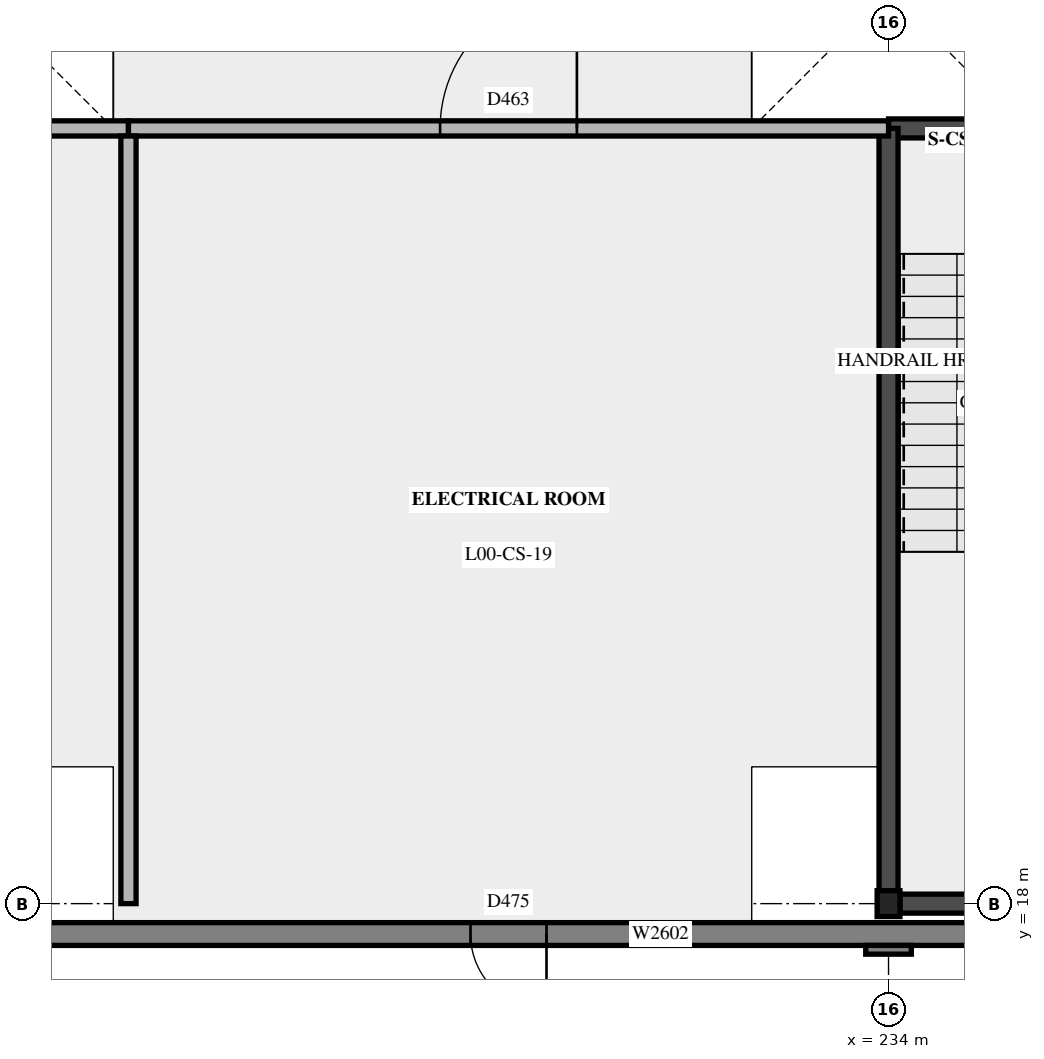
"""IFC4 building model, lengths in metres.
Left out: names, types, materials, properties, quantities, classifications, styles, units other than length and angle.
Written with IfcOpenShell. Run it as: python <this file> out.ifc"""

import sys

from ifc_helpers import new_model, si_unit, direction, frame, frame_2d, origin, origin_2d, place, context, subcontext, project, spatial, polyline, rectangle, i_section, outline, extrude, element, fill, save


model = new_model("IFC4")
c1 = context("Model", 3, precision=1e-05, world=origin(), true_north=direction((0.0, 1.0)))
c2 = subcontext(c1, "Body", "Model", "MODEL_VIEW")
j1 = project(units=[si_unit("LENGTHUNIT", "METRE"), si_unit("PLANEANGLEUNIT", "RADIAN")], contexts=[c1])
p1 = place(None, origin())
s1 = spatial("IfcSite", under=j1, at=p1, CompositionType="ELEMENT")
p2 = place(p1, origin())
s2 = spatial("IfcBuilding", under=s1, at=p2, CompositionType="ELEMENT")
p3 = place(p2, origin())
s3 = spatial("IfcBuildingStorey", under=s2, at=p3, CompositionType="ELEMENT", Elevation=0.0)
p4 = place(p3, frame((234.0, 18.0, 0.0), z_axis=(0.0, 0.0, 1.0), x_axis=(1.0, 0.0, 0.0)))
e1 = element("IfcColumn", 1, at=p4, inside=s3, PredefinedType="COLUMN", context=c2, shape_type="SweptSolid", body=[
    extrude(i_section(OverallWidth=0.3, OverallDepth=0.34, WebThickness=0.012, FlangeThickness=0.021, at=origin_2d()), origin(), (0.0, 0.0, 1.0), 5.4),
])
p5 = place(p3, frame((234.15, 18.0, 0.0), z_axis=(0.0, 0.0, 1.0), x_axis=(1.0, 0.0, 0.0)))
e2 = element("IfcWall", 2, at=p5, inside=s3, PredefinedType="SHEAR", context=c2, shape_type="SweptSolid", body=[
    extrude(rectangle(XDim=4.85, YDim=0.25, at=frame_2d((2.425, 0.0))), origin(), (0.0, 0.0, 1.0), 5.4),
])
p6 = place(p3, frame((234.0, 28.2, 0.0), z_axis=(0.0, 0.0, 1.0), x_axis=(1.0, 0.0, 0.0)))
e3 = element("IfcWall", 3, at=p6, inside=s3, PredefinedType="SHEAR", context=c2, shape_type="SweptSolid", body=[
    extrude(rectangle(XDim=5.0, YDim=0.25, at=frame_2d((2.5, 0.0))), origin(), (0.0, 0.0, 1.0), 5.4),
])
p7 = place(p6, frame((2.0, 0.0, 0.0)))
e4 = element("IfcOpeningElement", 4, at=p7, cuts=e3, PredefinedType="OPENING", context=c2, shape_type="SweptSolid", body=[
    extrude(rectangle(XDim=1.0, YDim=2.1, at=frame_2d((0.5, 1.05))), frame((0.0, 0.135, 0.0), z_axis=(0.0, -1.0, 0.0), x_axis=(1.0, 0.0, 0.0)), (0.0, 0.0, 1.0), 0.27),
])
p8 = place(p3, frame((234.0, 18.17, 0.0), z_axis=(0.0, 0.0, 1.0), x_axis=(0.0, 1.0, 0.0)))
e5 = element("IfcWall", 5, at=p8, inside=s3, PredefinedType="SHEAR", context=c2, shape_type="SweptSolid", body=[
    extrude(rectangle(XDim=10.03, YDim=0.25, at=frame_2d((5.015, 0.0))), origin(), (0.0, 0.0, 1.0), 5.4),
])
p9 = place(p3, frame((197.75, 17.6, 0.0), z_axis=(0.0, 0.0, 1.0), x_axis=(1.0, 0.0, 0.0)))
e6 = element("IfcWall", 6, at=p9, inside=s3, PredefinedType="SOLIDWALL", context=c2, shape_type="SweptSolid", body=[
    extrude(rectangle(XDim=84.5, YDim=0.3, at=frame_2d((42.25, 0.0))), origin(), (0.0, 0.0, 1.0), 5.4),
])
p10 = place(p9, frame((19.75, 0.0, 0.0), z_axis=(0.0, 0.0, 1.0), x_axis=(-1.0, 0.0, 0.0)))
e7 = element("IfcOpeningElement", 7, at=p10, cuts=e6, PredefinedType="OPENING", context=c2, shape_type="SweptSolid", body=[
    extrude(rectangle(XDim=1.0, YDim=2.1, at=frame_2d((0.5, 1.05))), frame((0.0, 0.16, 0.0), z_axis=(0.0, -1.0, 0.0), x_axis=(1.0, 0.0, 0.0)), (0.0, 0.0, 1.0), 0.32),
])
p11 = place(p9, frame((31.75, 0.0, 0.0), z_axis=(0.0, 0.0, 1.0), x_axis=(-1.0, 0.0, 0.0)))
e8 = element("IfcOpeningElement", 8, at=p11, cuts=e6, PredefinedType="OPENING", context=c2, shape_type="SweptSolid", body=[
    extrude(rectangle(XDim=1.0, YDim=2.1, at=frame_2d((0.5, 1.05))), frame((0.0, 0.16, 0.0), z_axis=(0.0, -1.0, 0.0), x_axis=(1.0, 0.0, 0.0)), (0.0, 0.0, 1.0), 0.32),
])
p12 = place(p9, frame((53.75, 0.0, 0.0), z_axis=(0.0, 0.0, 1.0), x_axis=(-1.0, 0.0, 0.0)))
e9 = element("IfcOpeningElement", 9, at=p12, cuts=e6, PredefinedType="OPENING", context=c2, shape_type="SweptSolid", body=[
    extrude(rectangle(XDim=1.0, YDim=2.1, at=frame_2d((0.5, 1.05))), frame((0.0, 0.16, 0.0), z_axis=(0.0, -1.0, 0.0), x_axis=(1.0, 0.0, 0.0)), (0.0, 0.0, 1.0), 0.32),
])
p13 = place(p9, frame((74.75, 0.0, 0.0), z_axis=(0.0, 0.0, 1.0), x_axis=(-1.0, 0.0, 0.0)))
e10 = element("IfcOpeningElement", 10, at=p13, cuts=e6, PredefinedType="OPENING", context=c2, shape_type="SweptSolid", body=[
    extrude(rectangle(XDim=1.0, YDim=2.1, at=frame_2d((0.5, 1.05))), frame((0.0, 0.16, 0.0), z_axis=(0.0, -1.0, 0.0), x_axis=(1.0, 0.0, 0.0)), (0.0, 0.0, 1.0), 0.32),
])
p14 = place(p9, frame((9.025, 0.0, 1.8)))
e11 = element("IfcOpeningElement", 11, at=p14, cuts=e6, PredefinedType="OPENING", context=c2, shape_type="SweptSolid", body=[
    extrude(rectangle(XDim=0.45, YDim=2.4, at=frame_2d((0.225, 1.2))), frame((0.0, 0.16, 0.0), z_axis=(0.0, -1.0, 0.0), x_axis=(1.0, 0.0, 0.0)), (0.0, 0.0, 1.0), 0.32),
])
p15 = place(p9, frame((33.025, 0.0, 1.8)))
e12 = element("IfcOpeningElement", 12, at=p15, cuts=e6, PredefinedType="OPENING", context=c2, shape_type="SweptSolid", body=[
    extrude(rectangle(XDim=0.45, YDim=2.4, at=frame_2d((0.225, 1.2))), frame((0.0, 0.16, 0.0), z_axis=(0.0, -1.0, 0.0), x_axis=(1.0, 0.0, 0.0)), (0.0, 0.0, 1.0), 0.32),
])
p16 = place(p9, frame((45.025, 0.0, 1.8)))
e13 = element("IfcOpeningElement", 13, at=p16, cuts=e6, PredefinedType="OPENING", context=c2, shape_type="SweptSolid", body=[
    extrude(rectangle(XDim=0.45, YDim=2.4, at=frame_2d((0.225, 1.2))), frame((0.0, 0.16, 0.0), z_axis=(0.0, -1.0, 0.0), x_axis=(1.0, 0.0, 0.0)), (0.0, 0.0, 1.0), 0.32),
])
p17 = place(p9, frame((57.025, 0.0, 1.8)))
e14 = element("IfcOpeningElement", 14, at=p17, cuts=e6, PredefinedType="OPENING", context=c2, shape_type="SweptSolid", body=[
    extrude(rectangle(XDim=0.45, YDim=2.4, at=frame_2d((0.225, 1.2))), frame((0.0, 0.16, 0.0), z_axis=(0.0, -1.0, 0.0), x_axis=(1.0, 0.0, 0.0)), (0.0, 0.0, 1.0), 0.32),
])
p18 = place(p9, frame((81.025, 0.0, 1.8)))
e15 = element("IfcOpeningElement", 15, at=p18, cuts=e6, PredefinedType="OPENING", context=c2, shape_type="SweptSolid", body=[
    extrude(rectangle(XDim=0.45, YDim=2.4, at=frame_2d((0.225, 1.2))), frame((0.0, 0.16, 0.0), z_axis=(0.0, -1.0, 0.0), x_axis=(1.0, 0.0, 0.0)), (0.0, 0.0, 1.0), 0.32),
])
p19 = place(p3, frame((233.7, 17.393, 0.0), z_axis=(0.0, 0.0, 1.0), x_axis=(1.0, 0.0, 0.0)))
e16 = element("IfcWall", 16, at=p19, inside=s3, PredefinedType="SOLIDWALL", context=c2, shape_type="SweptSolid", body=[
    extrude(rectangle(XDim=0.6, YDim=0.115, at=frame_2d((0.3, 0.0))), origin(), (0.0, 0.0, 1.0), 5.4),
])
p20 = place(p3, frame((215.0, 28.2, 0.0), z_axis=(0.0, 0.0, 1.0), x_axis=(1.0, 0.0, 0.0)))
e17 = element("IfcWall", 17, at=p20, inside=s3, PredefinedType="PARTITIONING", context=c2, shape_type="SweptSolid", body=[
    extrude(outline(polyline([(0.0, 0.0), (9.0, 0.0), (9.0, 5.15), (7.1, 5.15), (7.095, 4.68), (6.905, 4.68), (6.9, 5.15), (4.705, 5.15), (4.7, 4.63), (4.5, 4.63), (4.495, 5.15), (2.305, 5.15), (2.3, 4.63), (2.1, 4.63), (2.095, 5.15), (0.0, 5.15), (0.0, 0.0)])), frame((0.0, 0.1, 0.0), z_axis=(0.0, -1.0, 0.0), x_axis=(1.0, 0.0, 0.0)), (0.0, 0.0, 1.0), 0.2),
])
p21 = place(p20, frame((3.6, 0.0, 0.0)))
e18 = element("IfcOpeningElement", 18, at=p21, cuts=e17, PredefinedType="OPENING", context=c2, shape_type="SweptSolid", body=[
    extrude(rectangle(XDim=1.8, YDim=2.1, at=frame_2d((0.9, 1.05))), frame((0.0, 0.11, 0.0), z_axis=(0.0, -1.0, 0.0), x_axis=(1.0, 0.0, 0.0)), (0.0, 0.0, 1.0), 0.22),
])
p22 = place(p3, frame((224.0, 28.2, 0.0), z_axis=(0.0, 0.0, 1.0), x_axis=(1.0, 0.0, 0.0)))
e19 = element("IfcWall", 19, at=p22, inside=s3, PredefinedType="PARTITIONING", context=c2, shape_type="SweptSolid", body=[
    extrude(outline(polyline([(0.0, 0.0), (10.0, 0.0), (10.0, 5.15), (7.705, 5.15), (7.7, 4.63), (7.5, 4.63), (7.495, 5.15), (5.305, 5.15), (5.3, 4.63), (5.1, 4.63), (5.095, 5.15), (2.905, 5.15), (2.9, 4.63), (2.7, 4.63), (2.695, 5.15), (0.505, 5.15), (0.5, 4.63), (0.3, 4.63), (0.295, 5.15), (0.0, 5.15), (0.0, 0.0)])), frame((0.0, 0.1, 0.0), z_axis=(0.0, -1.0, 0.0), x_axis=(1.0, 0.0, 0.0)), (0.0, 0.0, 1.0), 0.2),
])
p23 = place(p22, frame((4.1, 0.0, 0.0)))
e20 = element("IfcOpeningElement", 20, at=p23, cuts=e19, PredefinedType="OPENING", context=c2, shape_type="SweptSolid", body=[
    extrude(rectangle(XDim=1.8, YDim=2.1, at=frame_2d((0.9, 1.05))), frame((0.0, 0.11, 0.0), z_axis=(0.0, -1.0, 0.0), x_axis=(1.0, 0.0, 0.0)), (0.0, 0.0, 1.0), 0.22),
])
p24 = place(p3, frame((224.0, 18.0, 0.0), z_axis=(0.0, 0.0, 1.0), x_axis=(0.0, 1.0, 0.0)))
e21 = element("IfcWall", 21, at=p24, inside=s3, PredefinedType="PARTITIONING", context=c2, shape_type="SweptSolid", body=[
    extrude(outline(polyline([(0.0, 0.0), (10.1, 0.0), (10.1, 5.15), (0.105, 5.15), (0.1, 4.63), (0.0, 4.63), (0.0, 0.0)])), frame((0.0, 0.1, 0.0), z_axis=(0.0, -1.0, 0.0), x_axis=(1.0, 0.0, 0.0)), (0.0, 0.0, 1.0), 0.2),
])
p25 = place(p11, origin())
e22 = element("IfcDoor", 22, at=p25, inside=s3, OperationType="SINGLE_SWING_LEFT", PredefinedType="DOOR", context=c2, shape_type="SweptSolid", body=[
    extrude(rectangle(XDim=1.0, YDim=2.1, at=frame_2d((0.5, 1.05))), frame((0.0, 0.025, 0.0), z_axis=(0.0, -1.0, 0.0), x_axis=(1.0, 0.0, 0.0)), (0.0, 0.0, 1.0), 0.05),
])
fill(e8, e22)
p26 = place(p15, origin())
e23 = element("IfcWindow", 23, at=p26, inside=s3, PartitioningType="SINGLE_PANEL", PredefinedType="WINDOW", context=c2, shape_type="SweptSolid", body=[
    extrude(rectangle(XDim=0.45, YDim=2.4, at=frame_2d((0.225, 1.2))), frame((0.0, 0.03, 0.0), z_axis=(0.0, -1.0, 0.0), x_axis=(1.0, 0.0, 0.0)), (0.0, 0.0, 1.0), 0.06),
])
fill(e12, e23)
p27 = place(p23, origin())
e24 = element("IfcDoor", 24, at=p27, inside=s3, OperationType="DOUBLE_DOOR_SINGLE_SWING", PredefinedType="DOOR", context=c2, shape_type="SweptSolid", body=[
    extrude(rectangle(XDim=1.8, YDim=2.1, at=frame_2d((0.9, 1.05))), frame((0.0, 0.025, 0.0), z_axis=(0.0, -1.0, 0.0), x_axis=(1.0, 0.0, 0.0)), (0.0, 0.0, 1.0), 0.05),
])
fill(e20, e24)
save(model, sys.argv[1])
